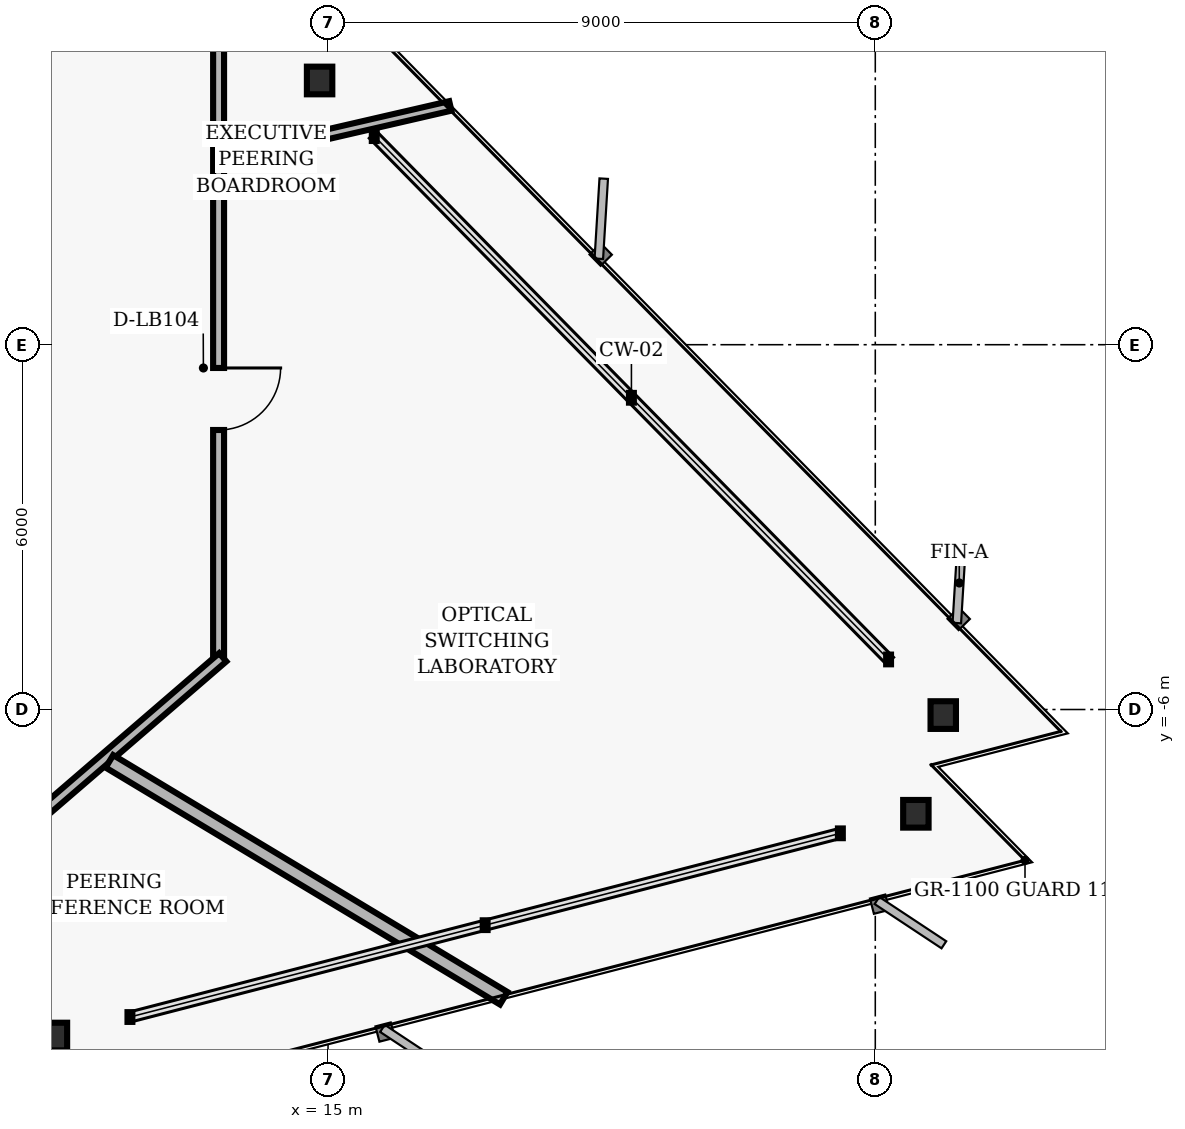
"""IFC4 building model, lengths in metres.
Left out: names, types, materials, properties, quantities, classifications, styles, units other than length and angle.
Written with IfcOpenShell. Run it as: python <this file> out.ifc"""

import sys

from ifc_helpers import new_model, si_unit, direction, frame, frame_2d, origin, origin_2d, place, context, subcontext, project, spatial, rectangle, i_section, extrude, element, fill, save


model = new_model("IFC4")
c1 = context("Model", 3, precision=1e-05, world=origin(), true_north=direction((0.0, 1.0)))
c2 = subcontext(c1, "Body", "Model", "MODEL_VIEW")
j1 = project(units=[si_unit("LENGTHUNIT", "METRE"), si_unit("PLANEANGLEUNIT", "RADIAN")], contexts=[c1])
p1 = place(None, origin())
s1 = spatial("IfcSite", under=j1, at=p1, CompositionType="ELEMENT")
p2 = place(p1, origin())
s2 = spatial("IfcBuilding", under=s1, at=p2, CompositionType="ELEMENT")
p3 = place(p2, frame((0.0, 0.0, 79.52)))
s3 = spatial("IfcBuildingStorey", under=s2, at=p3, CompositionType="ELEMENT", Elevation=79.52)
for number, where, z_axis, x_axis in (
    (1, (25.118, -6.092, 0.0), (0.0, 0.0, 1.0), (1.0, 0.0, 0.0)),
    (2, (14.861, 4.346, 0.0), (0.0, 0.0, 1.0), (1.0, 0.0, 0.0)),
    (3, (10.5, -11.379, 0.0), (0.0, 0.0, 1.0), (1.0, 0.0, 0.0)),
    (4, (24.667, -7.715, 0.0), (0.0, 0.0, 1.0), (1.0, 0.0, 0.0)),
):
    element("IfcColumn", number, at=place(p3, frame(where, z_axis=z_axis, x_axis=x_axis)), inside=s3, PredefinedType="COLUMN", context=c2, shape_type="SweptSolid", body=[
        extrude(i_section(OverallWidth=0.418, OverallDepth=0.455, WebThickness=0.042, FlangeThickness=0.068, FilletRadius=0.025, at=origin_2d()), origin(), (0.0, 0.0, 1.0), 3.04),
    ])
p4 = place(p3, frame((13.2, 5.11, 0.0), z_axis=(0.0, 0.0, 1.0), x_axis=(0.0, -1.0, 0.0)))
e5 = element("IfcWall", 5, at=p4, inside=s3, PredefinedType="PARTITIONING", context=c2, shape_type="SweptSolid", body=[
    extrude(rectangle(XDim=10.22, YDim=0.18, at=frame_2d((5.11, 0.0))), origin(), (0.0, 0.0, 1.0), 2.277),
])
p5 = place(p4, frame((5.493, 0.0, 0.0)))
e6 = element("IfcOpeningElement", 6, at=p5, cuts=e5, PredefinedType="OPENING", context=c2, shape_type="SweptSolid", body=[
    extrude(rectangle(XDim=1.02, YDim=2.02, at=frame_2d((0.51, 1.01))), frame((0.0, 0.1, 0.0), z_axis=(0.0, -1.0, 0.0), x_axis=(1.0, 0.0, 0.0)), (0.0, 0.0, 1.0), 0.2),
])
p6 = place(p3, frame((13.268, -5.141, 0.0), z_axis=(0.0, 0.0, 1.0), x_axis=(-0.757534501725, -0.65279512766, 0.0)))
e7 = element("IfcWall", 7, at=p6, inside=s3, PredefinedType="PARTITIONING", context=c2, shape_type="SweptSolid", body=[
    extrude(rectangle(XDim=6.385, YDim=0.18, at=frame_2d((3.192, 0.0))), origin(), (0.0, 0.0, 1.0), 2.763),
])
p7 = place(p3, frame((11.405, -6.853, 0.0), z_axis=(0.0, 0.0, 1.0), x_axis=(0.857165278127, -0.515041441025, 0.0)))
e8 = element("IfcWall", 8, at=p7, inside=s3, PredefinedType="PARTITIONING", context=c2, shape_type="SweptSolid", body=[
    extrude(rectangle(XDim=7.565, YDim=0.24, at=frame_2d((3.782, 0.0))), origin(), (0.0, 0.0, 1.0), 2.763),
])
p8 = place(p3, frame((13.28, 3.066, 0.0), z_axis=(0.0, 0.0, 1.0), x_axis=(0.974371849336, 0.224943324464, 0.0)))
e9 = element("IfcWall", 9, at=p8, inside=s3, PredefinedType="PARTITIONING", context=c2, shape_type="SweptSolid", body=[
    extrude(rectangle(XDim=3.829, YDim=0.16, at=frame_2d((1.915, 0.0))), origin(), (0.0, 0.0, 1.0), 2.763),
])
p9 = place(p5, origin())
e10 = element("IfcDoor", 10, at=p9, inside=s3, OperationType="SINGLE_SWING_LEFT", PredefinedType="DOOR", context=c2, shape_type="SweptSolid", body=[
    extrude(rectangle(XDim=1.02, YDim=2.02, at=frame_2d((0.51, 1.01))), frame((0.0, 0.025, 0.0), z_axis=(0.0, -1.0, 0.0), x_axis=(1.0, 0.0, 0.0)), (0.0, 0.0, 1.0), 0.05),
])
fill(e6, e10)
save(model, sys.argv[1])
